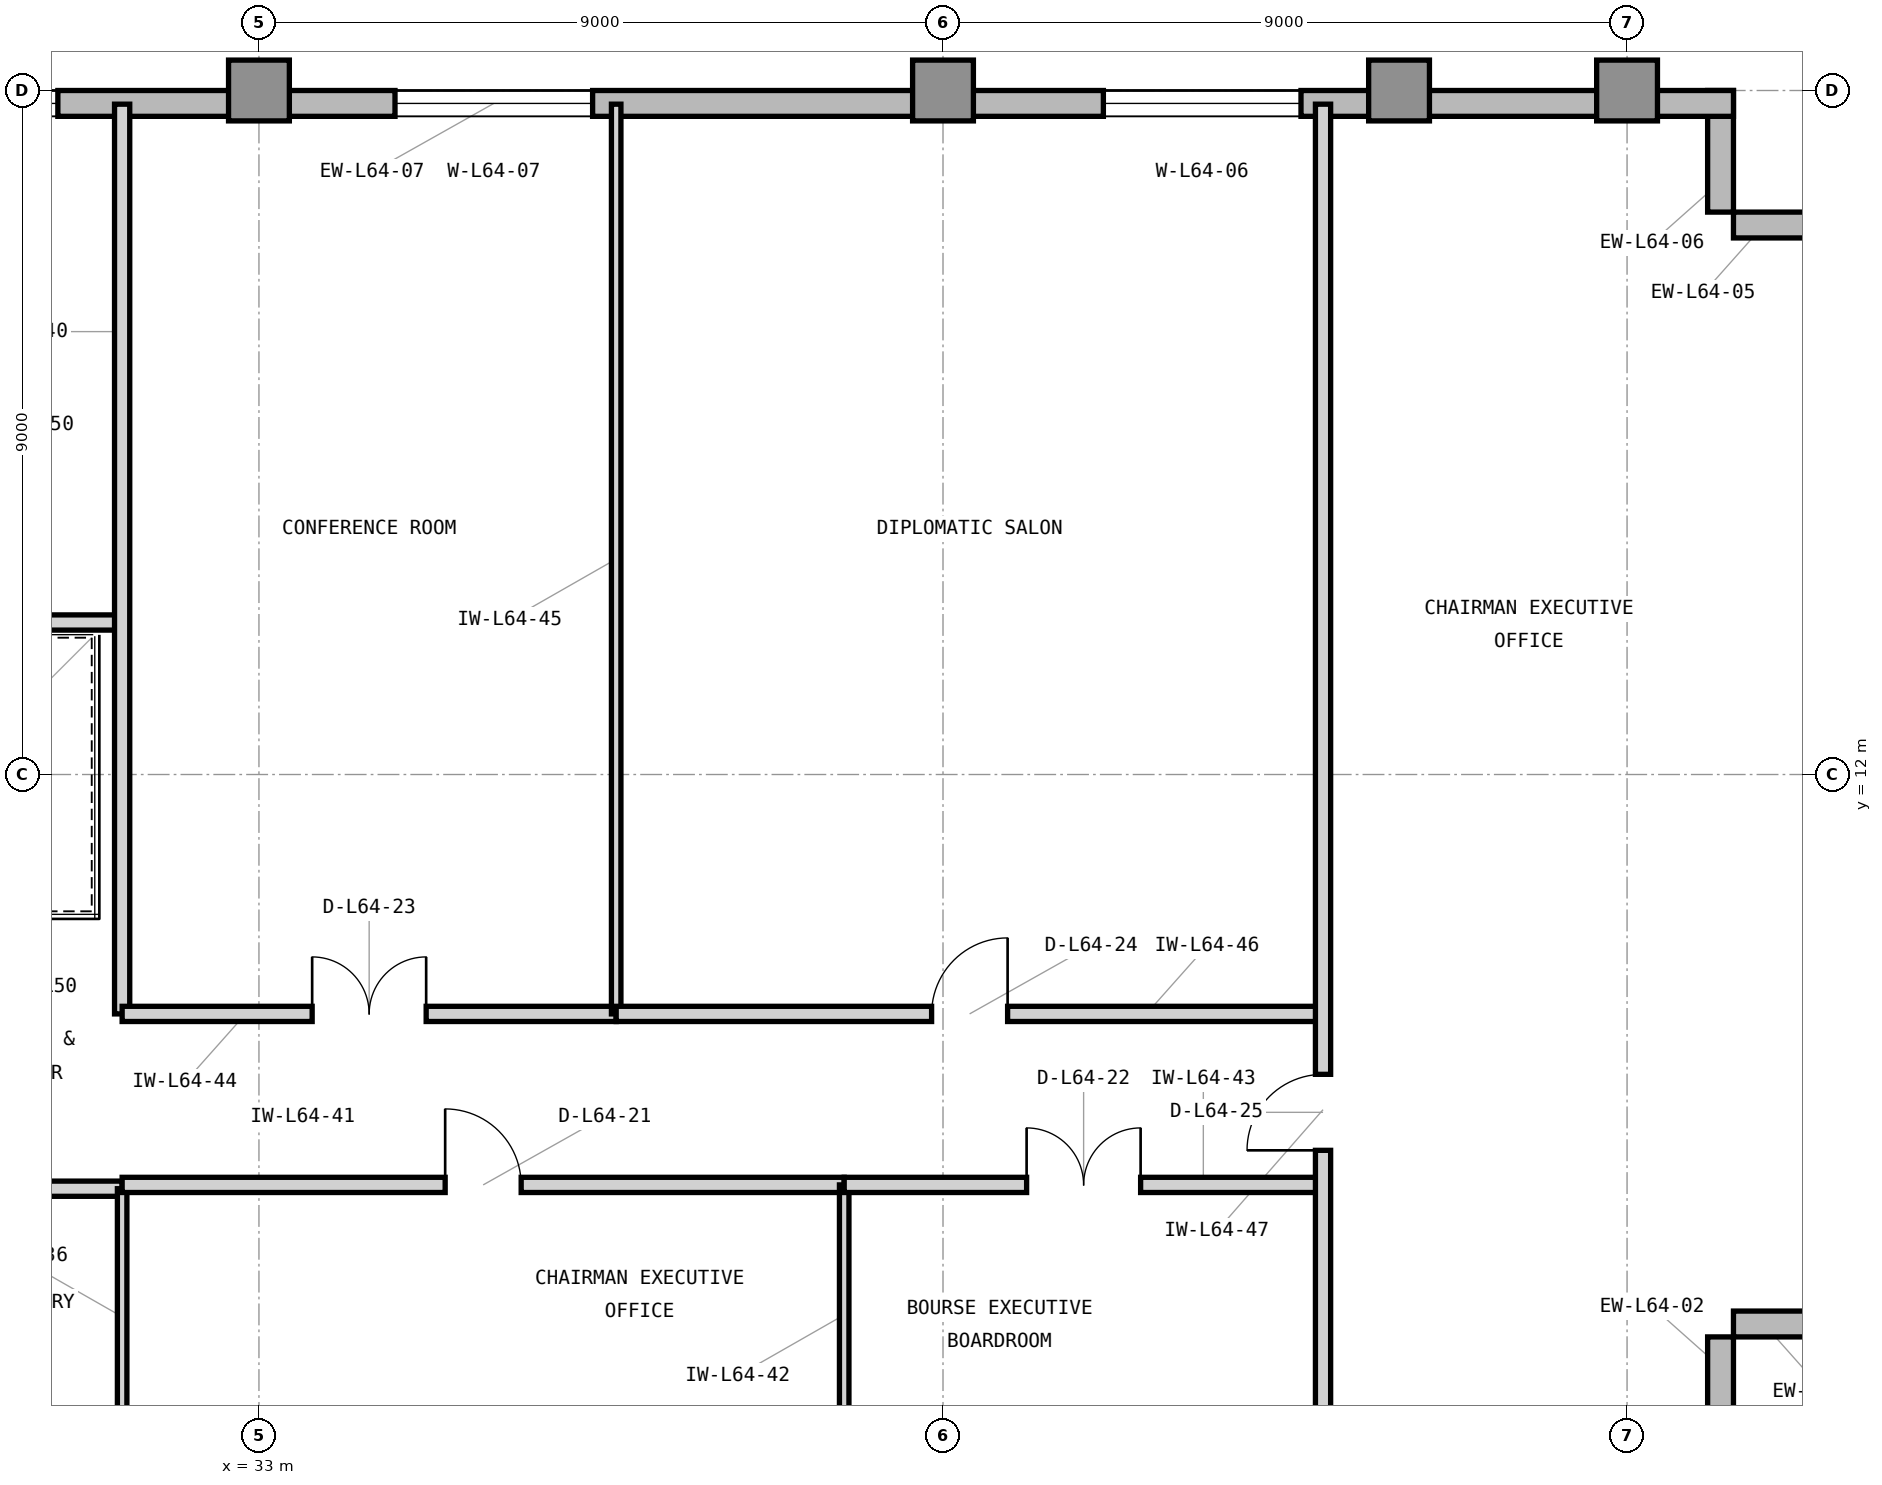
"""IFC4 building model, lengths in metres.
Left out: names, types, materials, properties, quantities, classifications, styles, units other than length and angle.
Written with IfcOpenShell. Run it as: python <this file> out.ifc"""

import sys

from ifc_helpers import new_model, si_unit, direction, frame, frame_2d, origin, origin_2d, place, context, subcontext, project, spatial, rectangle, extrude, element, fill, save


model = new_model("IFC4")
c1 = context("Model", 3, precision=1e-05, world=origin(), true_north=direction((0.0, 1.0)))
c2 = subcontext(c1, "Body", "Model", "MODEL_VIEW")
j1 = project(units=[si_unit("LENGTHUNIT", "METRE"), si_unit("PLANEANGLEUNIT", "RADIAN")], contexts=[c1])
p1 = place(None, origin())
s1 = spatial("IfcSite", under=j1, at=p1, CompositionType="ELEMENT")
p2 = place(p1, origin())
s2 = spatial("IfcBuilding", under=s1, at=p2, CompositionType="ELEMENT")
p3 = place(p2, frame((0.0, 0.0, 262.5)))
s3 = spatial("IfcBuildingStorey", under=s2, at=p3, CompositionType="ELEMENT", Elevation=262.5)
for number, where, z_axis, x_axis in (
    (1, (33.0, 21.0, 0.0), (0.0, 0.0, 1.0), (1.0, 0.0, 0.0)),
    (2, (42.0, 21.0, 0.0), (0.0, 0.0, 1.0), (1.0, 0.0, 0.0)),
    (3, (48.0, 21.0, 0.0), (0.0, 0.0, 1.0), (1.0, 0.0, 0.0)),
    (4, (51.0, 21.0, 0.0), (0.0, 0.0, 1.0), (1.0, 0.0, 0.0)),
):
    element("IfcColumn", number, at=place(p3, frame(where, z_axis=z_axis, x_axis=x_axis)), inside=s3, PredefinedType="COLUMN", context=c2, shape_type="SweptSolid", body=[
        extrude(rectangle(XDim=0.8, YDim=0.8, at=origin_2d()), origin(), (0.0, 0.0, 1.0), 3.9),
    ])
for number, where, z_axis, x_axis in (
    (5, (52.23, 3.0, 0.0), (0.0, 0.0, 1.0), (0.0, 1.0, 0.0)),
    (6, (52.4, 4.77, 0.0), (0.0, 0.0, 1.0), (1.0, 0.0, 0.0)),
    (7, (54.0, 19.23, 0.0), (0.0, 0.0, 1.0), (-1.0, 0.0, 0.0)),
    (8, (52.23, 19.4, 0.0), (0.0, 0.0, 1.0), (0.0, 1.0, 0.0)),
):
    element("IfcWall", number, at=place(p3, frame(where, z_axis=z_axis, x_axis=x_axis)), inside=s3, PredefinedType="STANDARD", context=c2, shape_type="SweptSolid", body=[
        extrude(rectangle(XDim=1.6, YDim=0.34, at=frame_2d((0.8, 0.0))), origin(), (0.0, 0.0, 1.0), 3.715),
    ])
p4 = place(p3, frame((52.4, 20.83, 0.0), z_axis=(0.0, 0.0, 1.0), x_axis=(-1.0, 0.0, 0.0)))
e9 = element("IfcWall", 9, at=p4, inside=s3, PredefinedType="STANDARD", context=c2, shape_type="SweptSolid", body=[
    extrude(rectangle(XDim=32.62, YDim=0.34, at=frame_2d((16.31, 0.0))), origin(), (0.0, 0.0, 1.0), 3.715),
])
p5 = place(p4, frame((5.69, 0.0, 0.8)))
e10 = element("IfcOpeningElement", 10, at=p5, cuts=e9, PredefinedType="OPENING", context=c2, shape_type="SweptSolid", body=[
    extrude(rectangle(XDim=2.6, YDim=2.35, at=frame_2d((1.3, 1.175))), frame((0.0, 0.18, 0.0), z_axis=(0.0, -1.0, 0.0), x_axis=(1.0, 0.0, 0.0)), (0.0, 0.0, 1.0), 0.36),
])
p6 = place(p4, frame((15.01, 0.0, 0.8)))
e11 = element("IfcOpeningElement", 11, at=p6, cuts=e9, PredefinedType="OPENING", context=c2, shape_type="SweptSolid", body=[
    extrude(rectangle(XDim=2.6, YDim=2.35, at=frame_2d((1.3, 1.175))), frame((0.0, 0.18, 0.0), z_axis=(0.0, -1.0, 0.0), x_axis=(1.0, 0.0, 0.0)), (0.0, 0.0, 1.0), 0.36),
])
p7 = place(p4, frame((26.226, 0.0, 0.8)))
e12 = element("IfcOpeningElement", 12, at=p7, cuts=e9, PredefinedType="OPENING", context=c2, shape_type="SweptSolid", body=[
    extrude(rectangle(XDim=1.2, YDim=2.35, at=frame_2d((0.6, 1.175))), frame((0.0, 0.18, 0.0), z_axis=(0.0, -1.0, 0.0), x_axis=(1.0, 0.0, 0.0)), (0.0, 0.0, 1.0), 0.36),
])
p8 = place(p4, frame((22.046, 0.0, 0.8)))
e13 = element("IfcOpeningElement", 13, at=p8, cuts=e9, PredefinedType="OPENING", context=c2, shape_type="SweptSolid", body=[
    extrude(rectangle(XDim=2.6, YDim=2.35, at=frame_2d((1.3, 1.175))), frame((0.0, 0.18, 0.0), z_axis=(0.0, -1.0, 0.0), x_axis=(1.0, 0.0, 0.0)), (0.0, 0.0, 1.0), 0.36),
])
p9 = place(p3, frame((23.85, 6.55, 0.0), z_axis=(0.0, 0.0, 1.0), x_axis=(1.0, 0.0, 0.0)))
e14 = element("IfcWall", 14, at=p9, inside=s3, PredefinedType="PARTITIONING", context=c2, shape_type="SweptSolid", body=[
    extrude(rectangle(XDim=7.35, YDim=0.2, at=frame_2d((3.675, 0.0))), origin(), (0.0, 0.0, 1.0), 3.705),
])
p10 = place(p9, frame((2.8, 0.0, 0.0)))
e15 = element("IfcOpeningElement", 15, at=p10, cuts=e14, PredefinedType="OPENING", context=c2, shape_type="SweptSolid", body=[
    extrude(rectangle(XDim=1.0, YDim=2.15, at=frame_2d((0.5, 1.075))), frame((0.0, 0.11, 0.0), z_axis=(0.0, -1.0, 0.0), x_axis=(1.0, 0.0, 0.0)), (0.0, 0.0, 1.0), 0.22),
])
p11 = place(p3, frame((31.2, 3.18, 0.0), z_axis=(0.0, 0.0, 1.0), x_axis=(0.0, 1.0, 0.0)))
e16 = element("IfcWall", 16, at=p11, inside=s3, PredefinedType="PARTITIONING", context=c2, shape_type="SweptSolid", body=[
    extrude(rectangle(XDim=3.37, YDim=0.125, at=frame_2d((1.685, 0.0))), origin(), (0.0, 0.0, 1.0), 3.705),
])
p12 = place(p3, frame((26.9, 14.0, 0.0), z_axis=(0.0, 0.0, 1.0), x_axis=(1.0, 0.0, 0.0)))
e17 = element("IfcWall", 17, at=p12, inside=s3, PredefinedType="PARTITIONING", context=c2, shape_type="SweptSolid", body=[
    extrude(rectangle(XDim=4.3, YDim=0.2, at=frame_2d((2.15, 0.0))), origin(), (0.0, 0.0, 1.0), 3.705),
])
p13 = place(p3, frame((31.2, 8.85, 0.0), z_axis=(0.0, 0.0, 1.0), x_axis=(0.0, 1.0, 0.0)))
e18 = element("IfcWall", 18, at=p13, inside=s3, PredefinedType="PARTITIONING", context=c2, shape_type="SweptSolid", body=[
    extrude(rectangle(XDim=11.97, YDim=0.2, at=frame_2d((5.985, 0.0))), origin(), (0.0, 0.0, 1.0), 3.705),
])
p14 = place(p3, frame((31.2, 6.6, 0.0), z_axis=(0.0, 0.0, 1.0), x_axis=(1.0, 0.0, 0.0)))
e19 = element("IfcWall", 19, at=p14, inside=s3, PredefinedType="PARTITIONING", context=c2, shape_type="SweptSolid", body=[
    extrude(rectangle(XDim=9.5, YDim=0.2, at=frame_2d((4.75, 0.0))), origin(), (0.0, 0.0, 1.0), 3.705),
])
p15 = place(p14, frame((4.25, 0.0, 0.0)))
e20 = element("IfcOpeningElement", 20, at=p15, cuts=e19, PredefinedType="OPENING", context=c2, shape_type="SweptSolid", body=[
    extrude(rectangle(XDim=1.0, YDim=2.15, at=frame_2d((0.5, 1.075))), frame((0.0, 0.11, 0.0), z_axis=(0.0, -1.0, 0.0), x_axis=(1.0, 0.0, 0.0)), (0.0, 0.0, 1.0), 0.22),
])
p16 = place(p3, frame((40.7, 3.18, 0.0), z_axis=(0.0, 0.0, 1.0), x_axis=(0.0, 1.0, 0.0)))
e21 = element("IfcWall", 21, at=p16, inside=s3, PredefinedType="PARTITIONING", context=c2, shape_type="SweptSolid", body=[
    extrude(rectangle(XDim=3.42, YDim=0.125, at=frame_2d((1.71, 0.0))), origin(), (0.0, 0.0, 1.0), 3.705),
])
p17 = place(p3, frame((40.7, 6.6, 0.0), z_axis=(0.0, 0.0, 1.0), x_axis=(1.0, 0.0, 0.0)))
e22 = element("IfcWall", 22, at=p17, inside=s3, PredefinedType="PARTITIONING", context=c2, shape_type="SweptSolid", body=[
    extrude(rectangle(XDim=6.3, YDim=0.2, at=frame_2d((3.15, 0.0))), origin(), (0.0, 0.0, 1.0), 3.705),
])
p18 = place(p17, frame((2.4, 0.0, 0.0)))
e23 = element("IfcOpeningElement", 23, at=p18, cuts=e22, PredefinedType="OPENING", context=c2, shape_type="SweptSolid", body=[
    extrude(rectangle(XDim=1.5, YDim=2.3, at=frame_2d((0.75, 1.15))), frame((0.0, 0.11, 0.0), z_axis=(0.0, -1.0, 0.0), x_axis=(1.0, 0.0, 0.0)), (0.0, 0.0, 1.0), 0.22),
])
p19 = place(p3, frame((31.2, 8.85, 0.0), z_axis=(0.0, 0.0, 1.0), x_axis=(1.0, 0.0, 0.0)))
e24 = element("IfcWall", 24, at=p19, inside=s3, PredefinedType="PARTITIONING", context=c2, shape_type="SweptSolid", body=[
    extrude(rectangle(XDim=6.5, YDim=0.2, at=frame_2d((3.25, 0.0))), origin(), (0.0, 0.0, 1.0), 3.705),
])
p20 = place(p19, frame((2.5, 0.0, 0.0)))
e25 = element("IfcOpeningElement", 25, at=p20, cuts=e24, PredefinedType="OPENING", context=c2, shape_type="SweptSolid", body=[
    extrude(rectangle(XDim=1.5, YDim=2.3, at=frame_2d((0.75, 1.15))), frame((0.0, 0.11, 0.0), z_axis=(0.0, -1.0, 0.0), x_axis=(1.0, 0.0, 0.0)), (0.0, 0.0, 1.0), 0.22),
])
p21 = place(p3, frame((37.7, 8.85, 0.0), z_axis=(0.0, 0.0, 1.0), x_axis=(0.0, 1.0, 0.0)))
e26 = element("IfcWall", 26, at=p21, inside=s3, PredefinedType="PARTITIONING", context=c2, shape_type="SweptSolid", body=[
    extrude(rectangle(XDim=11.97, YDim=0.125, at=frame_2d((5.985, 0.0))), origin(), (0.0, 0.0, 1.0), 3.705),
])
p22 = place(p3, frame((37.7, 8.85, 0.0), z_axis=(0.0, 0.0, 1.0), x_axis=(1.0, 0.0, 0.0)))
e27 = element("IfcWall", 27, at=p22, inside=s3, PredefinedType="PARTITIONING", context=c2, shape_type="SweptSolid", body=[
    extrude(rectangle(XDim=9.3, YDim=0.2, at=frame_2d((4.65, 0.0))), origin(), (0.0, 0.0, 1.0), 3.705),
])
p23 = place(p22, frame((4.15, 0.0, 0.0)))
e28 = element("IfcOpeningElement", 28, at=p23, cuts=e27, PredefinedType="OPENING", context=c2, shape_type="SweptSolid", body=[
    extrude(rectangle(XDim=1.0, YDim=2.15, at=frame_2d((0.5, 1.075))), frame((0.0, 0.11, 0.0), z_axis=(0.0, -1.0, 0.0), x_axis=(1.0, 0.0, 0.0)), (0.0, 0.0, 1.0), 0.22),
])
p24 = place(p3, frame((47.0, 3.18, 0.0), z_axis=(0.0, 0.0, 1.0), x_axis=(0.0, 1.0, 0.0)))
e29 = element("IfcWall", 29, at=p24, inside=s3, PredefinedType="PARTITIONING", context=c2, shape_type="SweptSolid", body=[
    extrude(rectangle(XDim=17.64, YDim=0.2, at=frame_2d((8.82, 0.0))), origin(), (0.0, 0.0, 1.0), 3.705),
])
p25 = place(p24, frame((3.875, 0.0, 0.0)))
e30 = element("IfcOpeningElement", 30, at=p25, cuts=e29, PredefinedType="OPENING", context=c2, shape_type="SweptSolid", body=[
    extrude(rectangle(XDim=1.0, YDim=2.15, at=frame_2d((0.5, 1.075))), frame((0.0, 0.11, 0.0), z_axis=(0.0, -1.0, 0.0), x_axis=(1.0, 0.0, 0.0)), (0.0, 0.0, 1.0), 0.22),
])
p26 = place(p5, origin())
e31 = element("IfcWindow", 31, at=p26, inside=s3, PartitioningType="SINGLE_PANEL", PredefinedType="WINDOW", context=c2, shape_type="SweptSolid", body=[
    extrude(rectangle(XDim=2.6, YDim=2.35, at=frame_2d((1.3, 1.175))), frame((0.0, 0.11, 0.0), z_axis=(0.0, -1.0, 0.0), x_axis=(1.0, 0.0, 0.0)), (0.0, 0.0, 1.0), 0.06),
])
fill(e10, e31)
p27 = place(p6, origin())
e32 = element("IfcWindow", 32, at=p27, inside=s3, PartitioningType="SINGLE_PANEL", PredefinedType="WINDOW", context=c2, shape_type="SweptSolid", body=[
    extrude(rectangle(XDim=2.6, YDim=2.35, at=frame_2d((1.3, 1.175))), frame((0.0, 0.11, 0.0), z_axis=(0.0, -1.0, 0.0), x_axis=(1.0, 0.0, 0.0)), (0.0, 0.0, 1.0), 0.06),
])
fill(e11, e32)
p28 = place(p15, origin())
e33 = element("IfcDoor", 33, at=p28, inside=s3, OperationType="SINGLE_SWING_LEFT", PredefinedType="DOOR", context=c2, shape_type="SweptSolid", body=[
    extrude(rectangle(XDim=1.0, YDim=2.15, at=frame_2d((0.5, 1.075))), frame((0.0, 0.025, 0.0), z_axis=(0.0, -1.0, 0.0), x_axis=(1.0, 0.0, 0.0)), (0.0, 0.0, 1.0), 0.05),
])
fill(e20, e33)
p29 = place(p18, origin())
e34 = element("IfcDoor", 34, at=p29, inside=s3, OperationType="DOUBLE_DOOR_SINGLE_SWING", PredefinedType="DOOR", context=c2, shape_type="SweptSolid", body=[
    extrude(rectangle(XDim=1.5, YDim=2.3, at=frame_2d((0.75, 1.15))), frame((0.0, 0.025, 0.0), z_axis=(0.0, -1.0, 0.0), x_axis=(1.0, 0.0, 0.0)), (0.0, 0.0, 1.0), 0.05),
])
fill(e23, e34)
p30 = place(p20, origin())
e35 = element("IfcDoor", 35, at=p30, inside=s3, OperationType="DOUBLE_DOOR_SINGLE_SWING", PredefinedType="DOOR", context=c2, shape_type="SweptSolid", body=[
    extrude(rectangle(XDim=1.5, YDim=2.3, at=frame_2d((0.75, 1.15))), frame((0.0, 0.025, 0.0), z_axis=(0.0, -1.0, 0.0), x_axis=(1.0, 0.0, 0.0)), (0.0, 0.0, 1.0), 0.05),
])
fill(e25, e35)
p31 = place(p23, origin())
e36 = element("IfcDoor", 36, at=p31, inside=s3, OperationType="SINGLE_SWING_RIGHT", PredefinedType="DOOR", context=c2, shape_type="SweptSolid", body=[
    extrude(rectangle(XDim=1.0, YDim=2.15, at=frame_2d((0.5, 1.075))), frame((0.0, 0.025, 0.0), z_axis=(0.0, -1.0, 0.0), x_axis=(1.0, 0.0, 0.0)), (0.0, 0.0, 1.0), 0.05),
])
fill(e28, e36)
p32 = place(p25, origin())
e37 = element("IfcDoor", 37, at=p32, inside=s3, OperationType="SINGLE_SWING_LEFT", PredefinedType="DOOR", context=c2, shape_type="SweptSolid", body=[
    extrude(rectangle(XDim=1.0, YDim=2.15, at=frame_2d((0.5, 1.075))), frame((0.0, 0.025, 0.0), z_axis=(0.0, -1.0, 0.0), x_axis=(1.0, 0.0, 0.0)), (0.0, 0.0, 1.0), 0.05),
])
fill(e30, e37)
p33 = place(p8, origin())
e38 = element("IfcWindow", 38, at=p33, inside=s3, PartitioningType="SINGLE_PANEL", PredefinedType="WINDOW", context=c2, shape_type="SweptSolid", body=[
    extrude(rectangle(XDim=2.6, YDim=2.35, at=frame_2d((1.3, 1.175))), frame((0.0, 0.11, 0.0), z_axis=(0.0, -1.0, 0.0), x_axis=(1.0, 0.0, 0.0)), (0.0, 0.0, 1.0), 0.06),
])
fill(e13, e38)
save(model, sys.argv[1])
